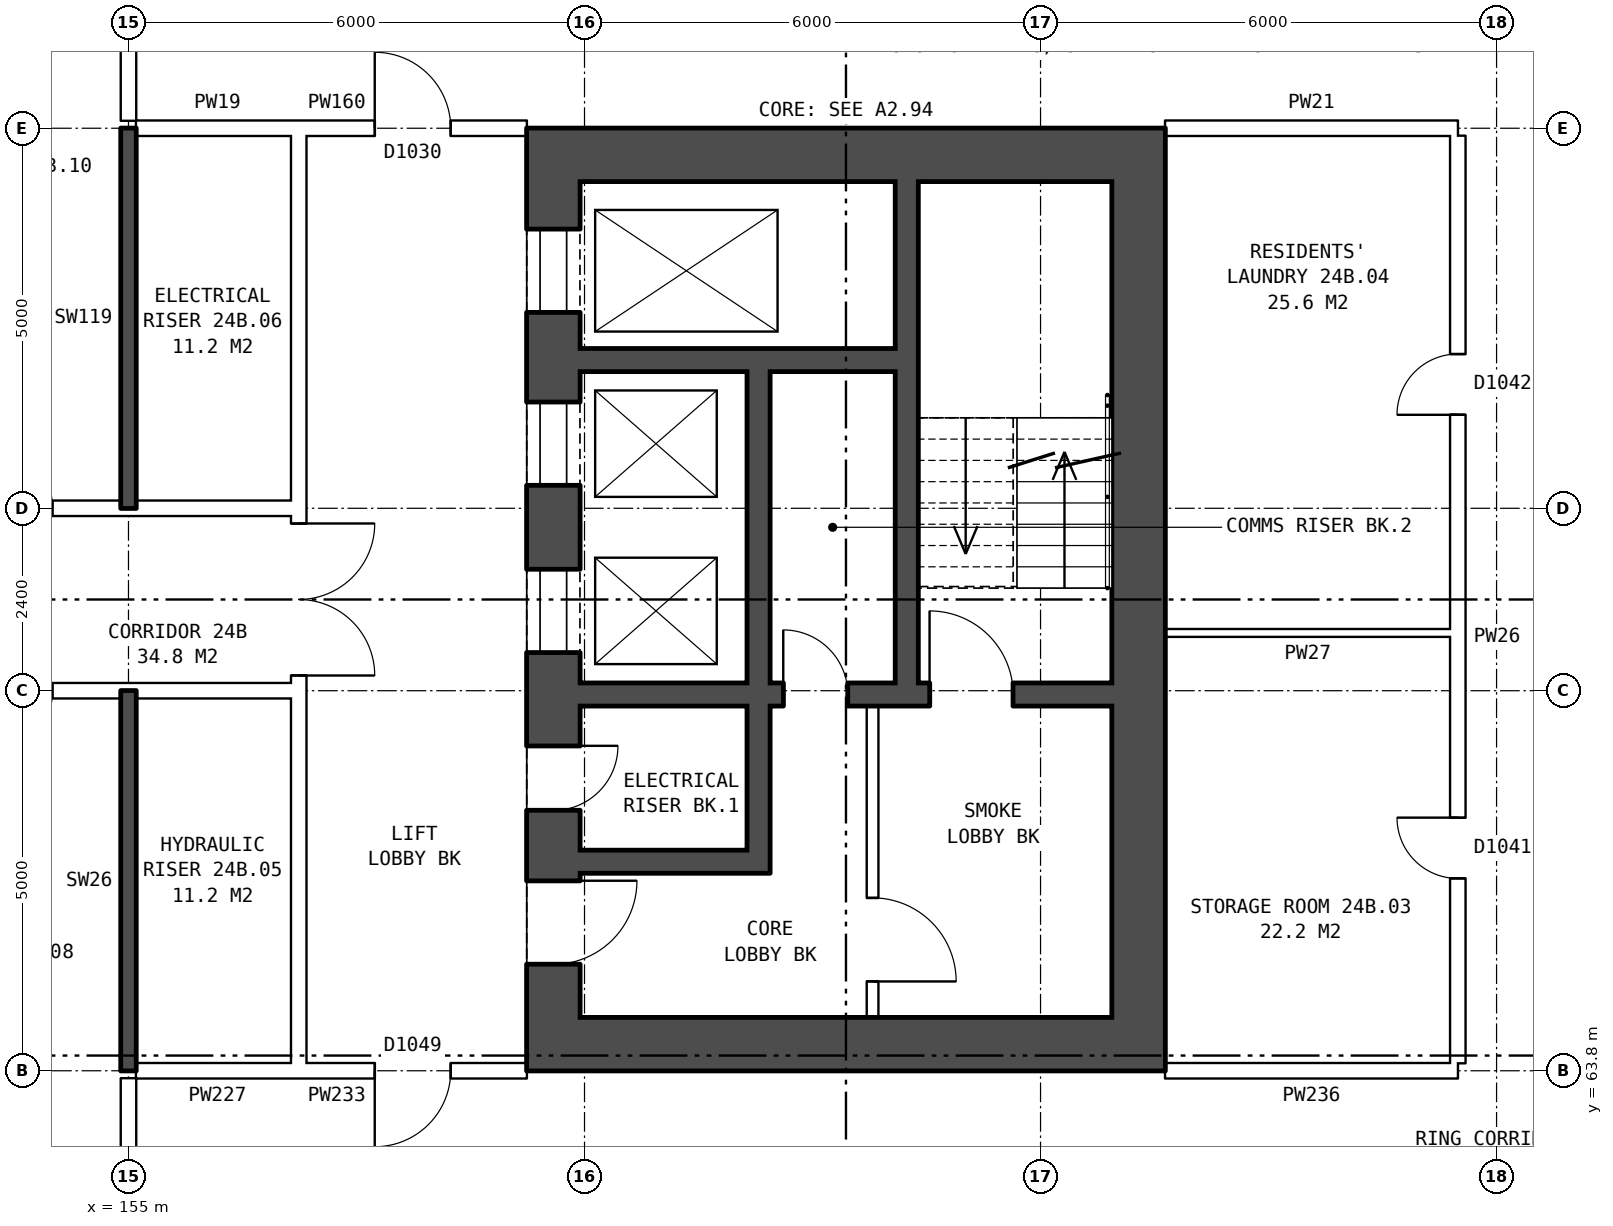
"""IFC4 building model, lengths in metres.
Left out: names, types, materials, properties, quantities, classifications, styles, units other than length and angle.
Written with IfcOpenShell. Run it as: python <this file> out.ifc"""

import sys

from ifc_helpers import new_model, si_unit, direction, frame, frame_2d, origin, place, context, subcontext, project, spatial, rectangle, extrude, element, fill, save


model = new_model("IFC4")
c1 = context("Model", 3, precision=1e-05, world=origin(), true_north=direction((0.0, 1.0)))
c2 = subcontext(c1, "Body", "Model", "MODEL_VIEW")
j1 = project(units=[si_unit("LENGTHUNIT", "METRE"), si_unit("PLANEANGLEUNIT", "RADIAN")], contexts=[c1])
p1 = place(None, origin())
s1 = spatial("IfcSite", under=j1, at=p1, CompositionType="ELEMENT")
p2 = place(p1, origin())
s2 = spatial("IfcBuilding", under=s1, at=p2, CompositionType="ELEMENT")
p3 = place(p2, frame((0.0, 0.0, 87.1)))
s3 = spatial("IfcBuildingStorey", under=s2, at=p3, CompositionType="ELEMENT", Elevation=87.1)
p4 = place(p3, frame((160.59, 75.5, 0.0), z_axis=(0.0, 0.0, 1.0), x_axis=(0.0, -1.0, 0.0)))
e1 = element("IfcWall", 1, at=p4, inside=s3, PredefinedType="SHEAR", context=c2, shape_type="SweptSolid", body=[
    extrude(rectangle(XDim=11.0, YDim=0.7, at=frame_2d((5.5, 0.0))), origin(), (0.0, 0.0, 1.0), 2.85),
])
p5 = place(p4, frame((0.625, 0.0, 0.0)))
e2 = element("IfcOpeningElement", 2, at=p5, cuts=e1, PredefinedType="OPENING", context=c2, shape_type="SweptSolid", body=[
    extrude(rectangle(XDim=1.1, YDim=2.1, at=frame_2d((0.55, 1.05))), frame((0.0, 0.36, 0.0), z_axis=(0.0, -1.0, 0.0), x_axis=(1.0, 0.0, 0.0)), (0.0, 0.0, 1.0), 0.72),
])
p6 = place(p4, frame((2.9, 0.0, 0.0)))
e3 = element("IfcOpeningElement", 3, at=p6, cuts=e1, PredefinedType="OPENING", context=c2, shape_type="SweptSolid", body=[
    extrude(rectangle(XDim=1.1, YDim=2.1, at=frame_2d((0.55, 1.05))), frame((0.0, 0.36, 0.0), z_axis=(0.0, -1.0, 0.0), x_axis=(1.0, 0.0, 0.0)), (0.0, 0.0, 1.0), 0.72),
])
p7 = place(p4, frame((5.1, 0.0, 0.0)))
e4 = element("IfcOpeningElement", 4, at=p7, cuts=e1, PredefinedType="OPENING", context=c2, shape_type="SweptSolid", body=[
    extrude(rectangle(XDim=1.1, YDim=2.1, at=frame_2d((0.55, 1.05))), frame((0.0, 0.36, 0.0), z_axis=(0.0, -1.0, 0.0), x_axis=(1.0, 0.0, 0.0)), (0.0, 0.0, 1.0), 0.72),
])
p8 = place(p4, frame((9.2, 0.0, 0.0)))
e5 = element("IfcOpeningElement", 5, at=p8, cuts=e1, PredefinedType="OPENING", context=c2, shape_type="SweptSolid", body=[
    extrude(rectangle(XDim=1.1, YDim=2.1, at=frame_2d((0.55, 1.05))), frame((0.0, 0.36, 0.0), z_axis=(0.0, -1.0, 0.0), x_axis=(1.0, 0.0, 0.0)), (0.0, 0.0, 1.0), 0.72),
])
p9 = place(p4, frame((7.425, 0.0, 0.0)))
e6 = element("IfcOpeningElement", 6, at=p9, cuts=e1, PredefinedType="OPENING", context=c2, shape_type="SweptSolid", body=[
    extrude(rectangle(XDim=0.85, YDim=2.1, at=frame_2d((0.425, 1.05))), frame((0.0, 0.36, 0.0), z_axis=(0.0, -1.0, 0.0), x_axis=(1.0, 0.0, 0.0)), (0.0, 0.0, 1.0), 0.72),
])
p10 = place(p3, frame((168.29, 75.5, 0.0), z_axis=(0.0, 0.0, 1.0), x_axis=(0.0, -1.0, 0.0)))
e7 = element("IfcWall", 7, at=p10, inside=s3, PredefinedType="SHEAR", context=c2, shape_type="SweptSolid", body=[
    extrude(rectangle(XDim=11.0, YDim=0.7, at=frame_2d((5.5, 0.0))), origin(), (0.0, 0.0, 1.0), 2.85),
])
for number, where, z_axis, x_axis in (
    (8, (160.24, 75.85, 0.0), (0.0, 0.0, 1.0), (1.0, 0.0, 0.0)),
    (9, (160.24, 64.15, 0.0), (0.0, 0.0, 1.0), (1.0, 0.0, 0.0)),
):
    element("IfcWall", number, at=place(p3, frame(where, z_axis=z_axis, x_axis=x_axis)), inside=s3, PredefinedType="SHEAR", context=c2, shape_type="SweptSolid", body=[
        extrude(rectangle(XDim=8.4, YDim=0.7, at=frame_2d((4.2, 0.0))), origin(), (0.0, 0.0, 1.0), 2.85),
    ])
p11 = place(p3, frame((160.94, 73.15, 0.0), z_axis=(0.0, 0.0, 1.0), x_axis=(1.0, 0.0, 0.0)))
e10 = element("IfcWall", 10, at=p11, inside=s3, PredefinedType="SHEAR", context=c2, shape_type="SweptSolid", body=[
    extrude(rectangle(XDim=4.15, YDim=0.3, at=frame_2d((2.075, 0.0))), origin(), (0.0, 0.0, 1.0), 2.85),
])
p12 = place(p3, frame((160.94, 68.75, 0.0), z_axis=(0.0, 0.0, 1.0), x_axis=(1.0, 0.0, 0.0)))
e11 = element("IfcWall", 11, at=p12, inside=s3, PredefinedType="SHEAR", context=c2, shape_type="SweptSolid", body=[
    extrude(rectangle(XDim=7.0, YDim=0.3, at=frame_2d((3.5, 0.0))), origin(), (0.0, 0.0, 1.0), 2.85),
])
p13 = place(p12, frame((4.6, 0.0, 0.0)))
e12 = element("IfcOpeningElement", 12, at=p13, cuts=e11, PredefinedType="OPENING", context=c2, shape_type="SweptSolid", body=[
    extrude(rectangle(XDim=1.1, YDim=2.1, at=frame_2d((0.55, 1.05))), frame((0.0, 0.16, 0.0), z_axis=(0.0, -1.0, 0.0), x_axis=(1.0, 0.0, 0.0)), (0.0, 0.0, 1.0), 0.32),
])
p14 = place(p12, frame((2.675, 0.0, 0.0)))
e13 = element("IfcOpeningElement", 13, at=p14, cuts=e11, PredefinedType="OPENING", context=c2, shape_type="SweptSolid", body=[
    extrude(rectangle(XDim=0.85, YDim=2.1, at=frame_2d((0.425, 1.05))), frame((0.0, 0.16, 0.0), z_axis=(0.0, -1.0, 0.0), x_axis=(1.0, 0.0, 0.0)), (0.0, 0.0, 1.0), 0.32),
])
p15 = place(p3, frame((160.94, 66.55, 0.0), z_axis=(0.0, 0.0, 1.0), x_axis=(1.0, 0.0, 0.0)))
e14 = element("IfcWall", 14, at=p15, inside=s3, PredefinedType="SHEAR", context=c2, shape_type="SweptSolid", body=[
    extrude(rectangle(XDim=2.2, YDim=0.3, at=frame_2d((1.1, 0.0))), origin(), (0.0, 0.0, 1.0), 2.85),
])
p16 = place(p3, frame((163.29, 73.0, 0.0), z_axis=(0.0, 0.0, 1.0), x_axis=(0.0, -1.0, 0.0)))
e15 = element("IfcWall", 15, at=p16, inside=s3, PredefinedType="SHEAR", context=c2, shape_type="SweptSolid", body=[
    extrude(rectangle(XDim=4.1, YDim=0.3, at=frame_2d((2.05, 0.0))), origin(), (0.0, 0.0, 1.0), 2.85),
])
p17 = place(p3, frame((163.29, 68.6, 0.0), z_axis=(0.0, 0.0, 1.0), x_axis=(0.0, -1.0, 0.0)))
e16 = element("IfcWall", 16, at=p17, inside=s3, PredefinedType="SHEAR", context=c2, shape_type="SweptSolid", body=[
    extrude(rectangle(XDim=2.2, YDim=0.3, at=frame_2d((1.1, 0.0))), origin(), (0.0, 0.0, 1.0), 2.85),
])
p18 = place(p3, frame((164.79, 68.6, 0.0), z_axis=(0.0, 0.0, 1.0), x_axis=(0.0, -1.0, 0.0)))
e17 = element("IfcWall", 17, at=p18, inside=s3, PredefinedType="PARTITIONING", context=c2, shape_type="SweptSolid", body=[
    extrude(rectangle(XDim=4.1, YDim=0.15, at=frame_2d((2.05, 0.0))), origin(), (0.0, 0.0, 1.0), 2.85),
])
p19 = place(p18, frame((2.525, 0.0, 0.0)))
e18 = element("IfcOpeningElement", 18, at=p19, cuts=e17, PredefinedType="OPENING", context=c2, shape_type="SweptSolid", body=[
    extrude(rectangle(XDim=1.1, YDim=2.1, at=frame_2d((0.55, 1.05))), frame((0.0, 0.085, 0.0), z_axis=(0.0, -1.0, 0.0), x_axis=(1.0, 0.0, 0.0)), (0.0, 0.0, 1.0), 0.17),
])
p20 = place(p3, frame((165.24, 75.5, 0.0), z_axis=(0.0, 0.0, 1.0), x_axis=(0.0, -1.0, 0.0)))
e19 = element("IfcWall", 19, at=p20, inside=s3, PredefinedType="SHEAR", context=c2, shape_type="SweptSolid", body=[
    extrude(rectangle(XDim=6.6, YDim=0.3, at=frame_2d((3.3, 0.0))), origin(), (0.0, 0.0, 1.0), 2.85),
])
p21 = place(p3, frame((157.24, 63.9, 0.0), z_axis=(0.0, 0.0, 1.0), x_axis=(0.0, 1.0, 0.0)))
e20 = element("IfcWall", 20, at=p21, inside=s3, PredefinedType="PARTITIONING", context=c2, shape_type="SweptSolid", body=[
    extrude(rectangle(XDim=12.2, YDim=0.2, at=frame_2d((6.1, 0.0))), origin(), (0.0, 0.0, 1.0), 2.85),
])
p22 = place(p21, frame((5.1, 0.0, 0.0)))
e21 = element("IfcOpeningElement", 21, at=p22, cuts=e20, PredefinedType="OPENING", context=c2, shape_type="SweptSolid", body=[
    extrude(rectangle(XDim=2.0, YDim=2.1, at=frame_2d((1.0, 1.05))), frame((0.0, 0.11, 0.0), z_axis=(0.0, -1.0, 0.0), x_axis=(1.0, 0.0, 0.0)), (0.0, 0.0, 1.0), 0.22),
])
p23 = place(p3, frame((155.1, 63.8, 0.0), z_axis=(0.0, 0.0, 1.0), x_axis=(1.0, 0.0, 0.0)))
e22 = element("IfcWall", 22, at=p23, inside=s3, PredefinedType="PARTITIONING", context=c2, shape_type="SweptSolid", body=[
    extrude(rectangle(XDim=2.14, YDim=0.2, at=frame_2d((1.07, 0.0))), origin(), (0.0, 0.0, 1.0), 2.85),
])
p24 = place(p3, frame((157.24, 63.8, 0.0), z_axis=(0.0, 0.0, 1.0), x_axis=(1.0, 0.0, 0.0)))
e23 = element("IfcWall", 23, at=p24, inside=s3, PredefinedType="PARTITIONING", context=c2, shape_type="SweptSolid", body=[
    extrude(rectangle(XDim=3.0, YDim=0.2, at=frame_2d((1.5, 0.0))), origin(), (0.0, 0.0, 1.0), 2.85),
])
p25 = place(p24, frame((1.0, 0.0, 0.0)))
e24 = element("IfcOpeningElement", 24, at=p25, cuts=e23, PredefinedType="OPENING", context=c2, shape_type="SweptSolid", body=[
    extrude(rectangle(XDim=1.0, YDim=2.1, at=frame_2d((0.5, 1.05))), frame((0.0, 0.11, 0.0), z_axis=(0.0, -1.0, 0.0), x_axis=(1.0, 0.0, 0.0)), (0.0, 0.0, 1.0), 0.22),
])
p26 = place(p3, frame((168.64, 63.8, 0.0), z_axis=(0.0, 0.0, 1.0), x_axis=(1.0, 0.0, 0.0)))
e25 = element("IfcWall", 25, at=p26, inside=s3, PredefinedType="PARTITIONING", context=c2, shape_type="SweptSolid", body=[
    extrude(rectangle(XDim=3.85, YDim=0.2, at=frame_2d((1.925, 0.0))), origin(), (0.0, 0.0, 1.0), 2.85),
])
p27 = place(p3, frame((142.76, 68.8, 0.0), z_axis=(0.0, 0.0, 1.0), x_axis=(1.0, 0.0, 0.0)))
e26 = element("IfcWall", 26, at=p27, inside=s3, PredefinedType="PARTITIONING", context=c2, shape_type="SweptSolid", body=[
    extrude(rectangle(XDim=14.48, YDim=0.2, at=frame_2d((7.24, 0.0))), origin(), (0.0, 0.0, 1.0), 2.85),
])
p28 = place(p27, frame((4.24, 0.0, 0.0)))
e27 = element("IfcOpeningElement", 27, at=p28, cuts=e26, PredefinedType="OPENING", context=c2, shape_type="SweptSolid", body=[
    extrude(rectangle(XDim=1.0, YDim=2.1, at=frame_2d((0.5, 1.05))), frame((0.0, 0.11, 0.0), z_axis=(0.0, -1.0, 0.0), x_axis=(1.0, 0.0, 0.0)), (0.0, 0.0, 1.0), 0.22),
])
p29 = place(p27, frame((10.24, 0.0, 0.0)))
e28 = element("IfcOpeningElement", 28, at=p29, cuts=e26, PredefinedType="OPENING", context=c2, shape_type="SweptSolid", body=[
    extrude(rectangle(XDim=1.0, YDim=2.1, at=frame_2d((0.5, 1.05))), frame((0.0, 0.11, 0.0), z_axis=(0.0, -1.0, 0.0), x_axis=(1.0, 0.0, 0.0)), (0.0, 0.0, 1.0), 0.22),
])
p30 = place(p3, frame((168.64, 69.56, 0.0), z_axis=(0.0, 0.0, 1.0), x_axis=(1.0, 0.0, 0.0)))
e29 = element("IfcWall", 29, at=p30, inside=s3, PredefinedType="PARTITIONING", context=c2, shape_type="SweptSolid", body=[
    extrude(rectangle(XDim=3.75, YDim=0.1, at=frame_2d((1.875, 0.0))), origin(), (0.0, 0.0, 1.0), 2.85),
])
p31 = place(p3, frame((142.76, 71.2, 0.0), z_axis=(0.0, 0.0, 1.0), x_axis=(1.0, 0.0, 0.0)))
e30 = element("IfcWall", 30, at=p31, inside=s3, PredefinedType="PARTITIONING", context=c2, shape_type="SweptSolid", body=[
    extrude(rectangle(XDim=14.48, YDim=0.2, at=frame_2d((7.24, 0.0))), origin(), (0.0, 0.0, 1.0), 2.85),
])
p32 = place(p31, frame((1.12, 0.0, 0.0)))
e31 = element("IfcOpeningElement", 31, at=p32, cuts=e30, PredefinedType="OPENING", context=c2, shape_type="SweptSolid", body=[
    extrude(rectangle(XDim=1.0, YDim=2.1, at=frame_2d((0.5, 1.05))), frame((0.0, 0.11, 0.0), z_axis=(0.0, -1.0, 0.0), x_axis=(1.0, 0.0, 0.0)), (0.0, 0.0, 1.0), 0.22),
])
p33 = place(p31, frame((10.24, 0.0, 0.0)))
e32 = element("IfcOpeningElement", 32, at=p33, cuts=e30, PredefinedType="OPENING", context=c2, shape_type="SweptSolid", body=[
    extrude(rectangle(XDim=1.0, YDim=2.1, at=frame_2d((0.5, 1.05))), frame((0.0, 0.11, 0.0), z_axis=(0.0, -1.0, 0.0), x_axis=(1.0, 0.0, 0.0)), (0.0, 0.0, 1.0), 0.22),
])
p34 = place(p3, frame((155.1, 76.2, 0.0), z_axis=(0.0, 0.0, 1.0), x_axis=(1.0, 0.0, 0.0)))
e33 = element("IfcWall", 33, at=p34, inside=s3, PredefinedType="PARTITIONING", context=c2, shape_type="SweptSolid", body=[
    extrude(rectangle(XDim=2.14, YDim=0.2, at=frame_2d((1.07, 0.0))), origin(), (0.0, 0.0, 1.0), 2.85),
])
p35 = place(p3, frame((157.24, 76.2, 0.0), z_axis=(0.0, 0.0, 1.0), x_axis=(1.0, 0.0, 0.0)))
e34 = element("IfcWall", 34, at=p35, inside=s3, PredefinedType="PARTITIONING", context=c2, shape_type="SweptSolid", body=[
    extrude(rectangle(XDim=3.0, YDim=0.2, at=frame_2d((1.5, 0.0))), origin(), (0.0, 0.0, 1.0), 2.85),
])
p36 = place(p35, frame((1.0, 0.0, 0.0)))
e35 = element("IfcOpeningElement", 35, at=p36, cuts=e34, PredefinedType="OPENING", context=c2, shape_type="SweptSolid", body=[
    extrude(rectangle(XDim=1.0, YDim=2.1, at=frame_2d((0.5, 1.05))), frame((0.0, 0.11, 0.0), z_axis=(0.0, -1.0, 0.0), x_axis=(1.0, 0.0, 0.0)), (0.0, 0.0, 1.0), 0.22),
])
p37 = place(p3, frame((168.64, 76.2, 0.0), z_axis=(0.0, 0.0, 1.0), x_axis=(1.0, 0.0, 0.0)))
e36 = element("IfcWall", 36, at=p37, inside=s3, PredefinedType="PARTITIONING", context=c2, shape_type="SweptSolid", body=[
    extrude(rectangle(XDim=3.85, YDim=0.2, at=frame_2d((1.925, 0.0))), origin(), (0.0, 0.0, 1.0), 2.85),
])
p38 = place(p3, frame((155.0, 61.5, 0.0), z_axis=(0.0, 0.0, 1.0), x_axis=(0.0, 1.0, 0.0)))
e37 = element("IfcWall", 37, at=p38, inside=s3, PredefinedType="PARTITIONING", context=c2, shape_type="SweptSolid", body=[
    extrude(rectangle(XDim=2.2, YDim=0.2, at=frame_2d((1.1, 0.0))), origin(), (0.0, 0.0, 1.0), 2.85),
])
for number, where, z_axis, x_axis in (
    (38, (155.0, 63.8, 0.0), (0.0, 0.0, 1.0), (0.0, 1.0, 0.0)),
    (39, (155.0, 71.2, 0.0), (0.0, 0.0, 1.0), (0.0, 1.0, 0.0)),
):
    element("IfcWall", number, at=place(p3, frame(where, z_axis=z_axis, x_axis=x_axis)), inside=s3, PredefinedType="SOLIDWALL", context=c2, shape_type="SweptSolid", body=[
        extrude(rectangle(XDim=5.0, YDim=0.2, at=frame_2d((2.5, 0.0))), origin(), (0.0, 0.0, 1.0), 2.85),
    ])
p39 = place(p3, frame((155.0, 76.3, 0.0), z_axis=(0.0, 0.0, 1.0), x_axis=(0.0, 1.0, 0.0)))
e40 = element("IfcWall", 40, at=p39, inside=s3, PredefinedType="PARTITIONING", context=c2, shape_type="SweptSolid", body=[
    extrude(rectangle(XDim=2.2, YDim=0.2, at=frame_2d((1.1, 0.0))), origin(), (0.0, 0.0, 1.0), 2.85),
])
p40 = place(p3, frame((172.49, 63.9, 0.0), z_axis=(0.0, 0.0, 1.0), x_axis=(0.0, 1.0, 0.0)))
e41 = element("IfcWall", 41, at=p40, inside=s3, PredefinedType="PARTITIONING", context=c2, shape_type="SweptSolid", body=[
    extrude(rectangle(XDim=12.2, YDim=0.2, at=frame_2d((6.1, 0.0))), origin(), (0.0, 0.0, 1.0), 2.85),
])
p41 = place(p40, frame((2.43, 0.0, 0.0)))
e42 = element("IfcOpeningElement", 42, at=p41, cuts=e41, PredefinedType="OPENING", context=c2, shape_type="SweptSolid", body=[
    extrude(rectangle(XDim=0.8, YDim=2.1, at=frame_2d((0.4, 1.05))), frame((0.0, 0.11, 0.0), z_axis=(0.0, -1.0, 0.0), x_axis=(1.0, 0.0, 0.0)), (0.0, 0.0, 1.0), 0.22),
])
p42 = place(p40, frame((8.53, 0.0, 0.0)))
e43 = element("IfcOpeningElement", 43, at=p42, cuts=e41, PredefinedType="OPENING", context=c2, shape_type="SweptSolid", body=[
    extrude(rectangle(XDim=0.8, YDim=2.1, at=frame_2d((0.4, 1.05))), frame((0.0, 0.11, 0.0), z_axis=(0.0, -1.0, 0.0), x_axis=(1.0, 0.0, 0.0)), (0.0, 0.0, 1.0), 0.22),
])
p43 = place(p5, origin())
e44 = element("IfcDoor", 44, at=p43, inside=s3, OperationType="DOUBLE_DOOR_SLIDING", PredefinedType="DOOR", context=c2, shape_type="SweptSolid", body=[
    extrude(rectangle(XDim=1.1, YDim=2.1, at=frame_2d((0.55, 1.05))), frame((0.0, 0.335, 0.0), z_axis=(0.0, -1.0, 0.0), x_axis=(1.0, 0.0, 0.0)), (0.0, 0.0, 1.0), 0.05),
])
fill(e2, e44)
p44 = place(p6, origin())
e45 = element("IfcDoor", 45, at=p44, inside=s3, OperationType="DOUBLE_DOOR_SLIDING", PredefinedType="DOOR", context=c2, shape_type="SweptSolid", body=[
    extrude(rectangle(XDim=1.1, YDim=2.1, at=frame_2d((0.55, 1.05))), frame((0.0, 0.335, 0.0), z_axis=(0.0, -1.0, 0.0), x_axis=(1.0, 0.0, 0.0)), (0.0, 0.0, 1.0), 0.05),
])
fill(e3, e45)
p45 = place(p7, origin())
e46 = element("IfcDoor", 46, at=p45, inside=s3, OperationType="DOUBLE_DOOR_SLIDING", PredefinedType="DOOR", context=c2, shape_type="SweptSolid", body=[
    extrude(rectangle(XDim=1.1, YDim=2.1, at=frame_2d((0.55, 1.05))), frame((0.0, 0.335, 0.0), z_axis=(0.0, -1.0, 0.0), x_axis=(1.0, 0.0, 0.0)), (0.0, 0.0, 1.0), 0.05),
])
fill(e4, e46)
p46 = place(p8, origin())
e47 = element("IfcDoor", 47, at=p46, inside=s3, OperationType="SINGLE_SWING_LEFT", PredefinedType="DOOR", context=c2, shape_type="SweptSolid", body=[
    extrude(rectangle(XDim=1.1, YDim=2.1, at=frame_2d((0.55, 1.05))), frame((0.0, 0.335, 0.0), z_axis=(0.0, -1.0, 0.0), x_axis=(1.0, 0.0, 0.0)), (0.0, 0.0, 1.0), 0.05),
])
fill(e5, e47)
p47 = place(p19, origin())
e48 = element("IfcDoor", 48, at=p47, inside=s3, OperationType="SINGLE_SWING_RIGHT", PredefinedType="DOOR", context=c2, shape_type="SweptSolid", body=[
    extrude(rectangle(XDim=1.1, YDim=2.1, at=frame_2d((0.55, 1.05))), frame((0.0, 0.025, 0.0), z_axis=(0.0, -1.0, 0.0), x_axis=(1.0, 0.0, 0.0)), (0.0, 0.0, 1.0), 0.05),
])
fill(e18, e48)
p48 = place(p13, origin())
e49 = element("IfcDoor", 49, at=p48, inside=s3, OperationType="SINGLE_SWING_LEFT", PredefinedType="DOOR", context=c2, shape_type="SweptSolid", body=[
    extrude(rectangle(XDim=1.1, YDim=2.1, at=frame_2d((0.55, 1.05))), frame((0.0, 0.025, 0.0), z_axis=(0.0, -1.0, 0.0), x_axis=(1.0, 0.0, 0.0)), (0.0, 0.0, 1.0), 0.05),
])
fill(e12, e49)
p49 = place(p9, origin())
e50 = element("IfcDoor", 50, at=p49, inside=s3, OperationType="SINGLE_SWING_LEFT", PredefinedType="DOOR", context=c2, shape_type="SweptSolid", body=[
    extrude(rectangle(XDim=0.85, YDim=2.1, at=frame_2d((0.425, 1.05))), frame((0.0, 0.335, 0.0), z_axis=(0.0, -1.0, 0.0), x_axis=(1.0, 0.0, 0.0)), (0.0, 0.0, 1.0), 0.05),
])
fill(e6, e50)
p50 = place(p14, origin())
e51 = element("IfcDoor", 51, at=p50, inside=s3, OperationType="SINGLE_SWING_LEFT", PredefinedType="DOOR", context=c2, shape_type="SweptSolid", body=[
    extrude(rectangle(XDim=0.85, YDim=2.1, at=frame_2d((0.425, 1.05))), frame((0.0, 0.025, 0.0), z_axis=(0.0, -1.0, 0.0), x_axis=(1.0, 0.0, 0.0)), (0.0, 0.0, 1.0), 0.05),
])
fill(e13, e51)
p51 = place(p22, frame((2.0, 0.0, 0.0), z_axis=(0.0, 0.0, 1.0), x_axis=(-1.0, 0.0, 0.0)))
e52 = element("IfcDoor", 52, at=p51, inside=s3, OperationType="DOUBLE_DOOR_SINGLE_SWING", PredefinedType="DOOR", context=c2, shape_type="SweptSolid", body=[
    extrude(rectangle(XDim=2.0, YDim=2.1, at=frame_2d((1.0, 1.05))), frame((0.0, 0.025, 0.0), z_axis=(0.0, -1.0, 0.0), x_axis=(1.0, 0.0, 0.0)), (0.0, 0.0, 1.0), 0.05),
])
fill(e21, e52)
p52 = place(p25, frame((1.0, 0.0, 0.0), z_axis=(0.0, 0.0, 1.0), x_axis=(-1.0, 0.0, 0.0)))
e53 = element("IfcDoor", 53, at=p52, inside=s3, OperationType="SINGLE_SWING_RIGHT", PredefinedType="DOOR", context=c2, shape_type="SweptSolid", body=[
    extrude(rectangle(XDim=1.0, YDim=2.1, at=frame_2d((0.5, 1.05))), frame((0.0, 0.025, 0.0), z_axis=(0.0, -1.0, 0.0), x_axis=(1.0, 0.0, 0.0)), (0.0, 0.0, 1.0), 0.05),
])
fill(e24, e53)
p53 = place(p36, origin())
e54 = element("IfcDoor", 54, at=p53, inside=s3, OperationType="SINGLE_SWING_LEFT", PredefinedType="DOOR", context=c2, shape_type="SweptSolid", body=[
    extrude(rectangle(XDim=1.0, YDim=2.1, at=frame_2d((0.5, 1.05))), frame((0.0, 0.025, 0.0), z_axis=(0.0, -1.0, 0.0), x_axis=(1.0, 0.0, 0.0)), (0.0, 0.0, 1.0), 0.05),
])
fill(e35, e54)
p54 = place(p41, origin())
e55 = element("IfcDoor", 55, at=p54, inside=s3, OperationType="SINGLE_SWING_RIGHT", PredefinedType="DOOR", context=c2, shape_type="SweptSolid", body=[
    extrude(rectangle(XDim=0.8, YDim=2.1, at=frame_2d((0.4, 1.05))), frame((0.0, 0.025, 0.0), z_axis=(0.0, -1.0, 0.0), x_axis=(1.0, 0.0, 0.0)), (0.0, 0.0, 1.0), 0.05),
])
fill(e42, e55)
p55 = place(p42, origin())
e56 = element("IfcDoor", 56, at=p55, inside=s3, OperationType="SINGLE_SWING_LEFT", PredefinedType="DOOR", context=c2, shape_type="SweptSolid", body=[
    extrude(rectangle(XDim=0.8, YDim=2.1, at=frame_2d((0.4, 1.05))), frame((0.0, 0.025, 0.0), z_axis=(0.0, -1.0, 0.0), x_axis=(1.0, 0.0, 0.0)), (0.0, 0.0, 1.0), 0.05),
])
fill(e43, e56)
save(model, sys.argv[1])
